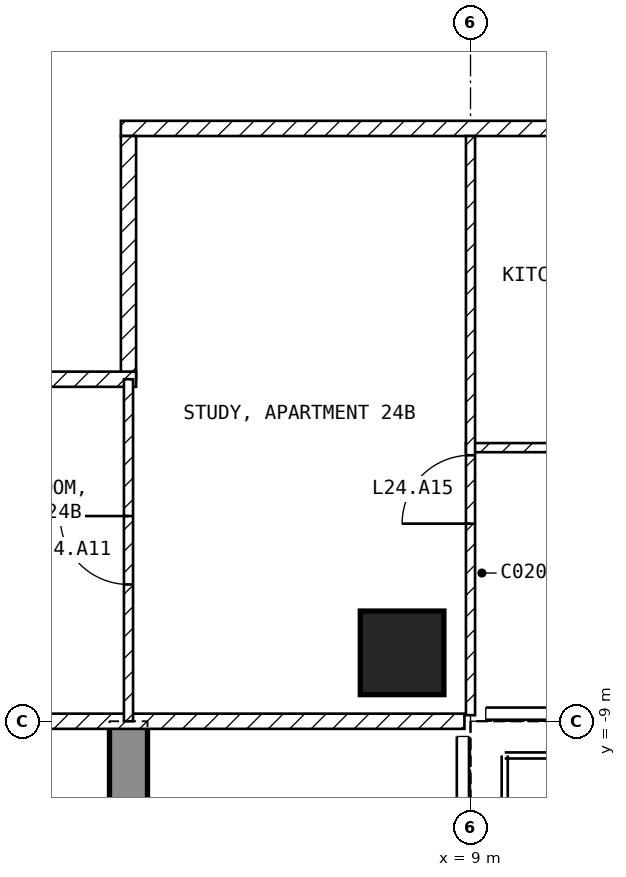
"""IFC4 building model, lengths in metres.
Left out: names, types, materials, properties, quantities, classifications, styles, units other than length and angle.
Written with IfcOpenShell. Run it as: python <this file> out.ifc"""

import sys

from ifc_helpers import new_model, si_unit, direction, frame, frame_2d, origin, origin_2d, place, context, subcontext, project, spatial, polyline, rectangle, outline, extrude, element, fill, save


model = new_model("IFC4")
c1 = context("Model", 3, precision=1e-05, world=origin(), true_north=direction((0.0, 1.0)))
c2 = subcontext(c1, "Body", "Model", "MODEL_VIEW")
j1 = project(units=[si_unit("LENGTHUNIT", "METRE"), si_unit("PLANEANGLEUNIT", "RADIAN")], contexts=[c1])
p1 = place(None, origin())
s1 = spatial("IfcSite", under=j1, at=p1, CompositionType="ELEMENT")
p2 = place(p1, origin())
s2 = spatial("IfcBuilding", under=s1, at=p2, CompositionType="ELEMENT")
p3 = place(p2, frame((0.0, 0.0, 105.9)))
s3 = spatial("IfcBuildingStorey", under=s2, at=p3, CompositionType="ELEMENT", Elevation=105.9)
p4 = place(p3, frame((8.1, -8.1, -0.25), z_axis=(0.0, 0.0, 1.0), x_axis=(1.0, 0.0, 0.0)))
e1 = element("IfcColumn", 1, at=p4, inside=s3, PredefinedType="COLUMN", context=c2, shape_type="SweptSolid", body=[
    extrude(rectangle(XDim=1.1, YDim=1.1, at=origin_2d()), origin(), (0.0, 0.0, 1.0), 3.5),
])
p5 = place(p3, frame((4.25, -20.15, -0.25), z_axis=(1.0, 0.0, 0.0), x_axis=(0.0, 1.0, 0.0)))
e2 = element("IfcWall", 2, at=p5, inside=s3, PredefinedType="SHEAR", context=c2, shape_type="SweptSolid", body=[
    extrude(outline(polyline([(0.0, 0.0), (6.65, 0.0), (6.65, 2.65), (9.05, 2.65), (9.05, 0.0), (11.15, 0.0), (11.15, 3.5), (0.0, 3.5), (0.0, 0.0)])), origin(), (0.0, 0.0, 1.0), 0.5),
])
p6 = place(p3, frame((21.6, -1.2, 0.0), z_axis=(0.0, 0.0, 1.0), x_axis=(-1.0, 0.0, 0.0)))
e3 = element("IfcWall", 3, at=p6, inside=s3, PredefinedType="PARTITIONING", context=c2, shape_type="SweptSolid", body=[
    extrude(rectangle(XDim=17.2, YDim=0.2, at=frame_2d((8.6, 0.0))), origin(), (0.0, 0.0, 1.0), 3.25),
])
p7 = place(p6, frame((3.85, 0.0, 0.0)))
e4 = element("IfcOpeningElement", 4, at=p7, cuts=e3, PredefinedType="OPENING", context=c2, shape_type="SweptSolid", body=[
    extrude(rectangle(XDim=1.0, YDim=2.1, at=frame_2d((0.5, 1.05))), frame((0.0, 0.11, 0.0), z_axis=(0.0, -1.0, 0.0), x_axis=(1.0, 0.0, 0.0)), (0.0, 0.0, 1.0), 0.22),
])
p8 = place(p3, frame((4.5, -1.3, 0.0), z_axis=(0.0, 0.0, 1.0), x_axis=(0.0, -1.0, 0.0)))
e5 = element("IfcWall", 5, at=p8, inside=s3, PredefinedType="PARTITIONING", context=c2, shape_type="SweptSolid", body=[
    extrude(rectangle(XDim=3.2, YDim=0.2, at=frame_2d((1.6, 0.0))), origin(), (0.0, 0.0, 1.0), 3.25),
])
p9 = place(p3, frame((4.6, -4.5, 0.0), z_axis=(0.0, 0.0, 1.0), x_axis=(-1.0, 0.0, 0.0)))
e6 = element("IfcWall", 6, at=p9, inside=s3, PredefinedType="PARTITIONING", context=c2, shape_type="SweptSolid", body=[
    extrude(rectangle(XDim=3.5, YDim=0.2, at=frame_2d((1.75, 0.0))), origin(), (0.0, 0.0, 1.0), 3.25),
])
p10 = place(p3, frame((8.92, -9.0, 0.0), z_axis=(0.0, 0.0, 1.0), x_axis=(-1.0, 0.0, 0.0)))
e7 = element("IfcWall", 7, at=p10, inside=s3, PredefinedType="PARTITIONING", context=c2, shape_type="SweptSolid", body=[
    extrude(rectangle(XDim=17.84, YDim=0.2, at=frame_2d((8.92, 0.0))), origin(), (0.0, 0.0, 1.0), 3.25),
])
p11 = place(p10, frame((8.42, 0.0, 0.0)))
e8 = element("IfcOpeningElement", 8, at=p11, cuts=e7, PredefinedType="OPENING", context=c2, shape_type="SweptSolid", body=[
    extrude(rectangle(XDim=1.0, YDim=2.1, at=frame_2d((0.5, 1.05))), frame((0.0, 0.11, 0.0), z_axis=(0.0, -1.0, 0.0), x_axis=(1.0, 0.0, 0.0)), (0.0, 0.0, 1.0), 0.22),
])
p12 = place(p3, frame((18.75, -5.4, 0.0), z_axis=(0.0, 0.0, 1.0), x_axis=(-1.0, 0.0, 0.0)))
e9 = element("IfcWall", 9, at=p12, inside=s3, PredefinedType="PARTITIONING", context=c2, shape_type="SweptSolid", body=[
    extrude(rectangle(XDim=9.81, YDim=0.12, at=frame_2d((4.905, 0.0))), origin(), (0.0, 0.0, 1.0), 3.25),
])
p13 = place(p12, frame((7.5, 0.0, 0.0)))
e10 = element("IfcOpeningElement", 10, at=p13, cuts=e9, PredefinedType="OPENING", context=c2, shape_type="SweptSolid", body=[
    extrude(rectangle(XDim=0.9, YDim=2.1, at=frame_2d((0.45, 1.05))), frame((0.0, 0.07, 0.0), z_axis=(0.0, -1.0, 0.0), x_axis=(1.0, 0.0, 0.0)), (0.0, 0.0, 1.0), 0.14),
])
p14 = place(p12, frame((1.425, 0.0, 0.0)))
e11 = element("IfcOpeningElement", 11, at=p14, cuts=e9, PredefinedType="OPENING", context=c2, shape_type="SweptSolid", body=[
    extrude(rectangle(XDim=0.9, YDim=2.1, at=frame_2d((0.45, 1.05))), frame((0.0, 0.07, 0.0), z_axis=(0.0, -1.0, 0.0), x_axis=(1.0, 0.0, 0.0)), (0.0, 0.0, 1.0), 0.14),
])
p15 = place(p3, frame((9.0, -8.92, 0.0), z_axis=(0.0, 0.0, 1.0), x_axis=(0.0, 1.0, 0.0)))
e12 = element("IfcWall", 12, at=p15, inside=s3, PredefinedType="PARTITIONING", context=c2, shape_type="SweptSolid", body=[
    extrude(rectangle(XDim=7.62, YDim=0.12, at=frame_2d((3.81, 0.0))), origin(), (0.0, 0.0, 1.0), 3.25),
])
p16 = place(p15, frame((2.52, 0.0, 0.0)))
e13 = element("IfcOpeningElement", 13, at=p16, cuts=e12, PredefinedType="OPENING", context=c2, shape_type="SweptSolid", body=[
    extrude(rectangle(XDim=0.9, YDim=2.1, at=frame_2d((0.45, 1.05))), frame((0.0, 0.07, 0.0), z_axis=(0.0, -1.0, 0.0), x_axis=(1.0, 0.0, 0.0)), (0.0, 0.0, 1.0), 0.14),
])
p17 = place(p3, frame((4.5, -9.0, 0.0), z_axis=(0.0, 0.0, 1.0), x_axis=(0.0, 1.0, 0.0)))
e14 = element("IfcWall", 14, at=p17, inside=s3, PredefinedType="PARTITIONING", context=c2, shape_type="SweptSolid", body=[
    extrude(rectangle(XDim=4.5, YDim=0.12, at=frame_2d((2.25, 0.0))), origin(), (0.0, 0.0, 1.0), 3.25),
])
p18 = place(p17, frame((1.8, 0.0, 0.0)))
e15 = element("IfcOpeningElement", 15, at=p18, cuts=e14, PredefinedType="OPENING", context=c2, shape_type="SweptSolid", body=[
    extrude(rectangle(XDim=0.9, YDim=2.1, at=frame_2d((0.45, 1.05))), frame((0.0, 0.07, 0.0), z_axis=(0.0, -1.0, 0.0), x_axis=(1.0, 0.0, 0.0)), (0.0, 0.0, 1.0), 0.14),
])
p19 = place(p18, origin())
e16 = element("IfcDoor", 16, at=p19, inside=s3, OperationType="SINGLE_SWING_RIGHT", PredefinedType="DOOR", context=c2, shape_type="SweptSolid", body=[
    extrude(rectangle(XDim=0.9, YDim=2.1, at=frame_2d((0.45, 1.05))), frame((0.0, 0.025, 0.0), z_axis=(0.0, -1.0, 0.0), x_axis=(1.0, 0.0, 0.0)), (0.0, 0.0, 1.0), 0.05),
])
fill(e15, e16)
p20 = place(p16, origin())
e17 = element("IfcDoor", 17, at=p20, inside=s3, OperationType="SINGLE_SWING_LEFT", PredefinedType="DOOR", context=c2, shape_type="SweptSolid", body=[
    extrude(rectangle(XDim=0.9, YDim=2.1, at=frame_2d((0.45, 1.05))), frame((0.0, 0.025, 0.0), z_axis=(0.0, -1.0, 0.0), x_axis=(1.0, 0.0, 0.0)), (0.0, 0.0, 1.0), 0.05),
])
fill(e13, e17)
save(model, sys.argv[1])
